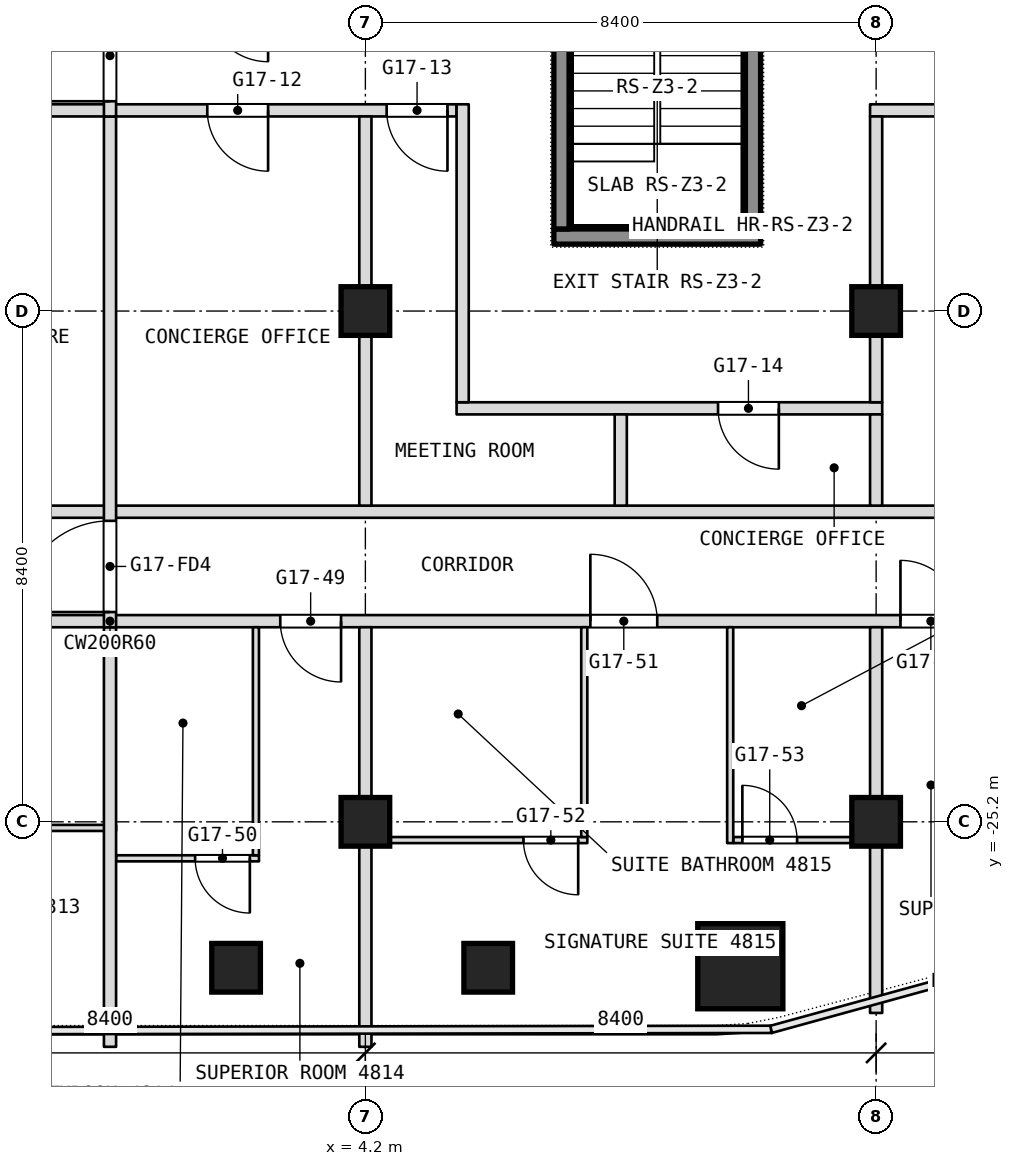
"""IFC4 building model, lengths in metres.
Left out: names, types, materials, properties, quantities, classifications, styles, units other than length and angle.
Written with IfcOpenShell. Run it as: python <this file> out.ifc"""

import sys

from ifc_helpers import new_model, si_unit, direction, frame, frame_2d, origin, origin_2d, place, context, subcontext, project, spatial, rectangle, extrude, element, fill, save


model = new_model("IFC4")
c1 = context("Model", 3, precision=1e-05, world=origin(), true_north=direction((0.0, 1.0)))
c2 = subcontext(c1, "Body", "Model", "MODEL_VIEW")
j1 = project(units=[si_unit("LENGTHUNIT", "METRE"), si_unit("PLANEANGLEUNIT", "RADIAN")], contexts=[c1])
p1 = place(None, origin())
s1 = spatial("IfcSite", under=j1, at=p1, CompositionType="ELEMENT")
p2 = place(p1, origin())
s2 = spatial("IfcBuilding", under=s1, at=p2, CompositionType="ELEMENT")
p3 = place(p2, frame((0.0, 0.0, 209.3)))
s3 = spatial("IfcBuildingStorey", under=s2, at=p3, CompositionType="ELEMENT", Elevation=209.3)
p4 = place(p3, frame((10.366, -27.575, 0.0), z_axis=(0.0, 0.0, 1.0), x_axis=(1.0, 0.0, 0.0)))
e1 = element("IfcColumn", 1, at=p4, inside=s3, PredefinedType="COLUMN", context=c2, shape_type="SweptSolid", body=[
    extrude(rectangle(XDim=1.4, YDim=1.4, at=origin_2d()), origin(), (0.0, 0.0, 1.0), 3.6),
])
for number, where, z_axis, x_axis in (
    (2, (4.2, -25.2, 0.0), (0.0, 0.0, 1.0), (1.0, 0.0, 0.0)),
    (3, (4.2, -16.8, 0.0), (0.0, 0.0, 1.0), (1.0, 0.0, 0.0)),
    (4, (12.6, -25.2, 0.0), (0.0, 0.0, 1.0), (1.0, 0.0, 0.0)),
    (5, (12.6, -16.8, 0.0), (0.0, 0.0, 1.0), (1.0, 0.0, 0.0)),
    (6, (6.22, -27.6, 0.0), (0.0, 0.0, 1.0), (1.0, 0.0, 0.0)),
    (7, (2.073, -27.6, 0.0), (0.0, 0.0, 1.0), (1.0, 0.0, 0.0)),
):
    element("IfcColumn", number, at=place(p3, frame(where, z_axis=z_axis, x_axis=x_axis)), inside=s3, PredefinedType="COLUMN", context=c2, shape_type="SweptSolid", body=[
        extrude(rectangle(XDim=0.8, YDim=0.8, at=origin_2d()), origin(), (0.0, 0.0, 1.0), 3.6),
    ])
p5 = place(p3, frame((0.1, -25.8, 0.0), z_axis=(0.0, 0.0, 1.0), x_axis=(1.0, 0.0, 0.0)))
e8 = element("IfcWall", 8, at=p5, inside=s3, PredefinedType="PARTITIONING", context=c2, shape_type="SweptSolid", body=[
    extrude(rectangle(XDim=2.35, YDim=0.1, at=frame_2d((1.175, 0.0))), origin(), (0.0, 0.0, 1.0), 3.34),
])
p6 = place(p5, frame((1.3, 0.0, 0.0)))
e9 = element("IfcOpeningElement", 9, at=p6, cuts=e8, PredefinedType="OPENING", context=c2, shape_type="SweptSolid", body=[
    extrude(rectangle(XDim=0.9, YDim=2.1, at=frame_2d((0.45, 1.05))), frame((0.0, 0.05, 0.0), z_axis=(0.0, -1.0, 0.0), x_axis=(1.0, 0.0, 0.0)), (0.0, 0.0, 1.0), 0.1),
])
p7 = place(p3, frame((4.3, -25.5, 0.0), z_axis=(0.0, 0.0, 1.0), x_axis=(1.0, 0.0, 0.0)))
e10 = element("IfcWall", 10, at=p7, inside=s3, PredefinedType="PARTITIONING", context=c2, shape_type="SweptSolid", body=[
    extrude(rectangle(XDim=3.55, YDim=0.1, at=frame_2d((1.775, 0.0))), origin(), (0.0, 0.0, 1.0), 3.34),
])
p8 = place(p7, frame((2.5, 0.0, 0.0)))
e11 = element("IfcOpeningElement", 11, at=p8, cuts=e10, PredefinedType="OPENING", context=c2, shape_type="SweptSolid", body=[
    extrude(rectangle(XDim=0.9, YDim=2.1, at=frame_2d((0.45, 1.05))), frame((0.0, 0.05, 0.0), z_axis=(0.0, -1.0, 0.0), x_axis=(1.0, 0.0, 0.0)), (0.0, 0.0, 1.0), 0.1),
])
p9 = place(p3, frame((10.25, -25.5, 0.0), z_axis=(0.0, 0.0, 1.0), x_axis=(1.0, 0.0, 0.0)))
e12 = element("IfcWall", 12, at=p9, inside=s3, PredefinedType="PARTITIONING", context=c2, shape_type="SweptSolid", body=[
    extrude(rectangle(XDim=2.45, YDim=0.1, at=frame_2d((1.225, 0.0))), origin(), (0.0, 0.0, 1.0), 3.34),
])
p10 = place(p9, frame((0.15, 0.0, 0.0)))
e13 = element("IfcOpeningElement", 13, at=p10, cuts=e12, PredefinedType="OPENING", context=c2, shape_type="SweptSolid", body=[
    extrude(rectangle(XDim=0.9, YDim=2.1, at=frame_2d((0.45, 1.05))), frame((0.0, 0.05, 0.0), z_axis=(0.0, -1.0, 0.0), x_axis=(1.0, 0.0, 0.0)), (0.0, 0.0, 1.0), 0.1),
])
p11 = place(p3, frame((-2.35, -25.3, 0.0), z_axis=(0.0, 0.0, 1.0), x_axis=(1.0, 0.0, 0.0)))
e14 = element("IfcWall", 14, at=p11, inside=s3, PredefinedType="PARTITIONING", context=c2, shape_type="SweptSolid", body=[
    extrude(rectangle(XDim=2.45, YDim=0.1, at=frame_2d((1.225, 0.0))), origin(), (0.0, 0.0, 1.0), 2.94),
])
p12 = place(p11, frame((0.15, 0.0, 0.0)))
e15 = element("IfcOpeningElement", 15, at=p12, cuts=e14, PredefinedType="OPENING", context=c2, shape_type="SweptSolid", body=[
    extrude(rectangle(XDim=0.9, YDim=2.1, at=frame_2d((0.45, 1.05))), frame((0.0, 0.05, 0.0), z_axis=(0.0, -1.0, 0.0), x_axis=(1.0, 0.0, 0.0)), (0.0, 0.0, 1.0), 0.1),
])
p13 = place(p3, frame((-16.7, -21.9, 0.0), z_axis=(0.0, 0.0, 1.0), x_axis=(1.0, 0.0, 0.0)))
e16 = element("IfcWall", 16, at=p13, inside=s3, PredefinedType="PARTITIONING", context=c2, shape_type="SweptSolid", body=[
    extrude(rectangle(XDim=33.4, YDim=0.2, at=frame_2d((16.7, 0.0))), origin(), (0.0, 0.0, 1.0), 3.34),
])
p14 = place(p13, frame((0.3, 0.0, 0.0)))
e17 = element("IfcOpeningElement", 17, at=p14, cuts=e16, PredefinedType="OPENING", context=c2, shape_type="SweptSolid", body=[
    extrude(rectangle(XDim=1.0, YDim=2.1, at=frame_2d((0.5, 1.05))), frame((0.0, 0.1, 0.0), z_axis=(0.0, -1.0, 0.0), x_axis=(1.0, 0.0, 0.0)), (0.0, 0.0, 1.0), 0.2),
])
p15 = place(p13, frame((6.9, 0.0, 0.0)))
e18 = element("IfcOpeningElement", 18, at=p15, cuts=e16, PredefinedType="OPENING", context=c2, shape_type="SweptSolid", body=[
    extrude(rectangle(XDim=1.0, YDim=2.1, at=frame_2d((0.5, 1.05))), frame((0.0, 0.1, 0.0), z_axis=(0.0, -1.0, 0.0), x_axis=(1.0, 0.0, 0.0)), (0.0, 0.0, 1.0), 0.2),
])
p16 = place(p13, frame((8.7, 0.0, 0.0)))
e19 = element("IfcOpeningElement", 19, at=p16, cuts=e16, PredefinedType="OPENING", context=c2, shape_type="SweptSolid", body=[
    extrude(rectangle(XDim=1.0, YDim=2.1, at=frame_2d((0.5, 1.05))), frame((0.0, 0.1, 0.0), z_axis=(0.0, -1.0, 0.0), x_axis=(1.0, 0.0, 0.0)), (0.0, 0.0, 1.0), 0.2),
])
p17 = place(p13, frame((12.9, 0.0, 0.0)))
e20 = element("IfcOpeningElement", 20, at=p17, cuts=e16, PredefinedType="OPENING", context=c2, shape_type="SweptSolid", body=[
    extrude(rectangle(XDim=1.0, YDim=2.1, at=frame_2d((0.5, 1.05))), frame((0.0, 0.1, 0.0), z_axis=(0.0, -1.0, 0.0), x_axis=(1.0, 0.0, 0.0)), (0.0, 0.0, 1.0), 0.2),
])
p18 = place(p13, frame((19.5, 0.0, 0.0)))
e21 = element("IfcOpeningElement", 21, at=p18, cuts=e16, PredefinedType="OPENING", context=c2, shape_type="SweptSolid", body=[
    extrude(rectangle(XDim=1.0, YDim=2.1, at=frame_2d((0.5, 1.05))), frame((0.0, 0.1, 0.0), z_axis=(0.0, -1.0, 0.0), x_axis=(1.0, 0.0, 0.0)), (0.0, 0.0, 1.0), 0.2),
])
p19 = place(p13, frame((24.6, 0.0, 0.0)))
e22 = element("IfcOpeningElement", 22, at=p19, cuts=e16, PredefinedType="OPENING", context=c2, shape_type="SweptSolid", body=[
    extrude(rectangle(XDim=1.1, YDim=2.1, at=frame_2d((0.55, 1.05))), frame((0.0, 0.1, 0.0), z_axis=(0.0, -1.0, 0.0), x_axis=(1.0, 0.0, 0.0)), (0.0, 0.0, 1.0), 0.2),
])
p20 = place(p13, frame((29.7, 0.0, 0.0)))
e23 = element("IfcOpeningElement", 23, at=p20, cuts=e16, PredefinedType="OPENING", context=c2, shape_type="SweptSolid", body=[
    extrude(rectangle(XDim=1.0, YDim=2.1, at=frame_2d((0.5, 1.05))), frame((0.0, 0.1, 0.0), z_axis=(0.0, -1.0, 0.0), x_axis=(1.0, 0.0, 0.0)), (0.0, 0.0, 1.0), 0.2),
])
p21 = place(p3, frame((-4.1, -20.1, 0.0), z_axis=(0.0, 0.0, 1.0), x_axis=(1.0, 0.0, 0.0)))
e24 = element("IfcWall", 24, at=p21, inside=s3, PredefinedType="PARTITIONING", context=c2, shape_type="SweptSolid", body=[
    extrude(rectangle(XDim=20.8, YDim=0.2, at=frame_2d((10.4, 0.0))), origin(), (0.0, 0.0, 1.0), 3.34),
])
p22 = place(p3, frame((5.7, -18.4, 0.0), z_axis=(0.0, 0.0, 1.0), x_axis=(1.0, 0.0, 0.0)))
e25 = element("IfcWall", 25, at=p22, inside=s3, PredefinedType="PARTITIONING", context=c2, shape_type="SweptSolid", body=[
    extrude(rectangle(XDim=7.0, YDim=0.2, at=frame_2d((3.5, 0.0))), origin(), (0.0, 0.0, 1.0), 3.34),
])
p23 = place(p22, frame((4.3, 0.0, 0.0)))
e26 = element("IfcOpeningElement", 26, at=p23, cuts=e25, PredefinedType="OPENING", context=c2, shape_type="SweptSolid", body=[
    extrude(rectangle(XDim=1.0, YDim=2.1, at=frame_2d((0.5, 1.05))), frame((0.0, 0.1, 0.0), z_axis=(0.0, -1.0, 0.0), x_axis=(1.0, 0.0, 0.0)), (0.0, 0.0, 1.0), 0.2),
])
p24 = place(p3, frame((-4.3, -13.5, 0.0), z_axis=(0.0, 0.0, 1.0), x_axis=(1.0, 0.0, 0.0)))
e27 = element("IfcWall", 27, at=p24, inside=s3, PredefinedType="PARTITIONING", context=c2, shape_type="SweptSolid", body=[
    extrude(rectangle(XDim=10.0, YDim=0.2, at=frame_2d((5.0, 0.0))), origin(), (0.0, 0.0, 1.0), 3.34),
])
p25 = place(p24, frame((1.7, 0.0, 0.0)))
e28 = element("IfcOpeningElement", 28, at=p25, cuts=e27, PredefinedType="OPENING", context=c2, shape_type="SweptSolid", body=[
    extrude(rectangle(XDim=1.0, YDim=2.1, at=frame_2d((0.5, 1.05))), frame((0.0, 0.1, 0.0), z_axis=(0.0, -1.0, 0.0), x_axis=(1.0, 0.0, 0.0)), (0.0, 0.0, 1.0), 0.2),
])
p26 = place(p24, frame((5.9, 0.0, 0.0)))
e29 = element("IfcOpeningElement", 29, at=p26, cuts=e27, PredefinedType="OPENING", context=c2, shape_type="SweptSolid", body=[
    extrude(rectangle(XDim=1.0, YDim=2.1, at=frame_2d((0.5, 1.05))), frame((0.0, 0.1, 0.0), z_axis=(0.0, -1.0, 0.0), x_axis=(1.0, 0.0, 0.0)), (0.0, 0.0, 1.0), 0.2),
])
p27 = place(p24, frame((8.85, 0.0, 0.0)))
e30 = element("IfcOpeningElement", 30, at=p27, cuts=e27, PredefinedType="OPENING", context=c2, shape_type="SweptSolid", body=[
    extrude(rectangle(XDim=1.0, YDim=2.1, at=frame_2d((0.5, 1.05))), frame((0.0, 0.1, 0.0), z_axis=(0.0, -1.0, 0.0), x_axis=(1.0, 0.0, 0.0)), (0.0, 0.0, 1.0), 0.2),
])
p28 = place(p3, frame((12.5, -13.5, 0.0), z_axis=(0.0, 0.0, 1.0), x_axis=(1.0, 0.0, 0.0)))
e31 = element("IfcWall", 31, at=p28, inside=s3, PredefinedType="PARTITIONING", context=c2, shape_type="SweptSolid", body=[
    extrude(rectangle(XDim=4.2, YDim=0.2, at=frame_2d((2.1, 0.0))), origin(), (0.0, 0.0, 1.0), 3.34),
])
p29 = place(p28, frame((1.7, 0.0, 0.0)))
e32 = element("IfcOpeningElement", 32, at=p29, cuts=e31, PredefinedType="OPENING", context=c2, shape_type="SweptSolid", body=[
    extrude(rectangle(XDim=1.0, YDim=2.1, at=frame_2d((0.5, 1.05))), frame((0.0, 0.1, 0.0), z_axis=(0.0, -1.0, 0.0), x_axis=(1.0, 0.0, 0.0)), (0.0, 0.0, 1.0), 0.2),
])
p30 = place(p3, frame((12.6, -28.343, 0.0), z_axis=(0.0, 0.0, 1.0), x_axis=(0.0, 1.0, 0.0)))
e33 = element("IfcWall", 33, at=p30, inside=s3, PredefinedType="PARTITIONING", context=c2, shape_type="SweptSolid", body=[
    extrude(rectangle(XDim=6.343, YDim=0.2, at=frame_2d((3.171, 0.0))), origin(), (0.0, 0.0, 1.0), 3.34),
])
p31 = place(p3, frame((12.6, -20.0, 0.0), z_axis=(0.0, 0.0, 1.0), x_axis=(0.0, 1.0, 0.0)))
e34 = element("IfcWall", 34, at=p31, inside=s3, PredefinedType="PARTITIONING", context=c2, shape_type="SweptSolid", body=[
    extrude(rectangle(XDim=1.5, YDim=0.2, at=frame_2d((0.75, 0.0))), origin(), (0.0, 0.0, 1.0), 3.34),
])
p32 = place(p3, frame((12.6, -18.3, 0.0), z_axis=(0.0, 0.0, 1.0), x_axis=(0.0, 1.0, 0.0)))
e35 = element("IfcWall", 35, at=p32, inside=s3, PredefinedType="PARTITIONING", context=c2, shape_type="SweptSolid", body=[
    extrude(rectangle(XDim=4.7, YDim=0.2, at=frame_2d((2.35, 0.0))), origin(), (0.0, 0.0, 1.0), 3.34),
])
p33 = place(p3, frame((10.2, -25.55, 0.0), z_axis=(0.0, 0.0, 1.0), x_axis=(0.0, 1.0, 0.0)))
e36 = element("IfcWall", 36, at=p33, inside=s3, PredefinedType="PARTITIONING", context=c2, shape_type="SweptSolid", body=[
    extrude(rectangle(XDim=3.55, YDim=0.1, at=frame_2d((1.775, 0.0))), origin(), (0.0, 0.0, 1.0), 3.34),
])
p34 = place(p3, frame((8.4, -20.0, 0.0), z_axis=(0.0, 0.0, 1.0), x_axis=(0.0, 1.0, 0.0)))
e37 = element("IfcWall", 37, at=p34, inside=s3, PredefinedType="PARTITIONING", context=c2, shape_type="SweptSolid", body=[
    extrude(rectangle(XDim=1.5, YDim=0.2, at=frame_2d((0.75, 0.0))), origin(), (0.0, 0.0, 1.0), 3.34),
])
p35 = place(p3, frame((7.8, -25.45, 0.0), z_axis=(0.0, 0.0, 1.0), x_axis=(0.0, 1.0, 0.0)))
e38 = element("IfcWall", 38, at=p35, inside=s3, PredefinedType="PARTITIONING", context=c2, shape_type="SweptSolid", body=[
    extrude(rectangle(XDim=3.45, YDim=0.1, at=frame_2d((1.725, 0.0))), origin(), (0.0, 0.0, 1.0), 3.34),
])
p36 = place(p3, frame((5.8, -18.3, 0.0), z_axis=(0.0, 0.0, 1.0), x_axis=(0.0, 1.0, 0.0)))
e39 = element("IfcWall", 39, at=p36, inside=s3, PredefinedType="PARTITIONING", context=c2, shape_type="SweptSolid", body=[
    extrude(rectangle(XDim=4.9, YDim=0.2, at=frame_2d((2.45, 0.0))), origin(), (0.0, 0.0, 1.0), 3.34),
])
p37 = place(p3, frame((4.2, -28.9, 0.0), z_axis=(0.0, 0.0, 1.0), x_axis=(0.0, 1.0, 0.0)))
e40 = element("IfcWall", 40, at=p37, inside=s3, PredefinedType="PARTITIONING", context=c2, shape_type="SweptSolid", body=[
    extrude(rectangle(XDim=6.9, YDim=0.2, at=frame_2d((3.45, 0.0))), origin(), (0.0, 0.0, 1.0), 3.34),
])
p38 = place(p3, frame((4.2, -20.0, 0.0), z_axis=(0.0, 0.0, 1.0), x_axis=(0.0, 1.0, 0.0)))
e41 = element("IfcWall", 41, at=p38, inside=s3, PredefinedType="PARTITIONING", context=c2, shape_type="SweptSolid", body=[
    extrude(rectangle(XDim=6.4, YDim=0.2, at=frame_2d((3.2, 0.0))), origin(), (0.0, 0.0, 1.0), 3.34),
])
p39 = place(p3, frame((2.4, -25.75, 0.0), z_axis=(0.0, 0.0, 1.0), x_axis=(0.0, 1.0, 0.0)))
e42 = element("IfcWall", 42, at=p39, inside=s3, PredefinedType="PARTITIONING", context=c2, shape_type="SweptSolid", body=[
    extrude(rectangle(XDim=3.75, YDim=0.1, at=frame_2d((1.875, 0.0))), origin(), (0.0, 0.0, 1.0), 3.34),
])
p40 = place(p3, frame((0.0, -28.9, 0.0), z_axis=(0.0, 0.0, 1.0), x_axis=(0.0, 1.0, 0.0)))
e43 = element("IfcWall", 43, at=p40, inside=s3, PredefinedType="PARTITIONING", context=c2, shape_type="SweptSolid", body=[
    extrude(rectangle(XDim=6.9, YDim=0.2, at=frame_2d((3.45, 0.0))), origin(), (0.0, 0.0, 1.0), 3.34),
])
p41 = place(p3, frame((0.0, -22.0, 0.0), z_axis=(0.0, 0.0, 1.0), x_axis=(0.0, 1.0, 0.0)))
e44 = element("IfcWall", 44, at=p41, inside=s3, PredefinedType="PARTITIONING", context=c2, shape_type="SweptSolid", body=[
    extrude(rectangle(XDim=8.4, YDim=0.2, at=frame_2d((4.2, 0.0))), origin(), (0.0, 0.0, 1.0), 3.34),
])
p42 = place(p41, frame((0.25, 0.0, 0.0)))
e45 = element("IfcOpeningElement", 45, at=p42, cuts=e44, PredefinedType="OPENING", context=c2, shape_type="SweptSolid", body=[
    extrude(rectangle(XDim=1.5, YDim=2.1, at=frame_2d((0.75, 1.05))), frame((0.0, 0.1, 0.0), z_axis=(0.0, -1.0, 0.0), x_axis=(1.0, 0.0, 0.0)), (0.0, 0.0, 1.0), 0.2),
])
p43 = place(p3, frame((0.0, -13.6, 0.0), z_axis=(0.0, 0.0, 1.0), x_axis=(0.0, 1.0, 0.0)))
e46 = element("IfcWall", 46, at=p43, inside=s3, PredefinedType="PARTITIONING", context=c2, shape_type="SweptSolid", body=[
    extrude(rectangle(XDim=13.6, YDim=0.2, at=frame_2d((6.8, 0.0))), origin(), (0.0, 0.0, 1.0), 3.34),
])
p44 = place(p43, frame((11.95, 0.0, 0.0)))
e47 = element("IfcOpeningElement", 47, at=p44, cuts=e46, PredefinedType="OPENING", context=c2, shape_type="SweptSolid", body=[
    extrude(rectangle(XDim=1.5, YDim=2.1, at=frame_2d((0.75, 1.05))), frame((0.0, 0.1, 0.0), z_axis=(0.0, -1.0, 0.0), x_axis=(1.0, 0.0, 0.0)), (0.0, 0.0, 1.0), 0.2),
])
p45 = place(p43, frame((0.25, 0.0, 0.0)))
e48 = element("IfcOpeningElement", 48, at=p45, cuts=e46, PredefinedType="OPENING", context=c2, shape_type="SweptSolid", body=[
    extrude(rectangle(XDim=1.5, YDim=2.1, at=frame_2d((0.75, 1.05))), frame((0.0, 0.1, 0.0), z_axis=(0.0, -1.0, 0.0), x_axis=(1.0, 0.0, 0.0)), (0.0, 0.0, 1.0), 0.2),
])
p46 = place(p3, frame((7.3, -15.575, 0.1), z_axis=(0.0, 0.0, 1.0), x_axis=(1.0, 0.0, 0.0)))
e49 = element("IfcWall", 49, at=p46, inside=s3, PredefinedType="SHEAR", context=c2, shape_type="SweptSolid", body=[
    extrude(rectangle(XDim=3.4, YDim=0.25, at=frame_2d((1.7, 0.0))), origin(), (0.0, 0.0, 1.0), 3.6),
])
for number, where, z_axis, x_axis in (
    (50, (7.425, -15.45, 0.1), (0.0, 0.0, 1.0), (0.0, 1.0, 0.0)),
    (51, (10.575, -15.45, 0.1), (0.0, 0.0, 1.0), (0.0, 1.0, 0.0)),
):
    element("IfcWall", number, at=place(p3, frame(where, z_axis=z_axis, x_axis=x_axis)), inside=s3, PredefinedType="SHEAR", context=c2, shape_type="SweptSolid", body=[
        extrude(rectangle(XDim=5.7, YDim=0.25, at=frame_2d((2.85, 0.0))), origin(), (0.0, 0.0, 1.0), 3.6),
    ])
p47 = place(p6, origin())
e52 = element("IfcDoor", 52, at=p47, inside=s3, OperationType="SINGLE_SWING_RIGHT", PredefinedType="DOOR", context=c2, shape_type="SweptSolid", body=[
    extrude(rectangle(XDim=0.9, YDim=2.1, at=frame_2d((0.45, 1.05))), frame((0.0, 0.025, 0.0), z_axis=(0.0, -1.0, 0.0), x_axis=(1.0, 0.0, 0.0)), (0.0, 0.0, 1.0), 0.05),
])
fill(e9, e52)
p48 = place(p8, origin())
e53 = element("IfcDoor", 53, at=p48, inside=s3, OperationType="SINGLE_SWING_RIGHT", PredefinedType="DOOR", context=c2, shape_type="SweptSolid", body=[
    extrude(rectangle(XDim=0.9, YDim=2.1, at=frame_2d((0.45, 1.05))), frame((0.0, 0.025, 0.0), z_axis=(0.0, -1.0, 0.0), x_axis=(1.0, 0.0, 0.0)), (0.0, 0.0, 1.0), 0.05),
])
fill(e11, e53)
p49 = place(p10, origin())
e54 = element("IfcDoor", 54, at=p49, inside=s3, OperationType="SINGLE_SWING_LEFT", PredefinedType="DOOR", context=c2, shape_type="SweptSolid", body=[
    extrude(rectangle(XDim=0.9, YDim=2.1, at=frame_2d((0.45, 1.05))), frame((0.0, 0.025, 0.0), z_axis=(0.0, -1.0, 0.0), x_axis=(1.0, 0.0, 0.0)), (0.0, 0.0, 1.0), 0.05),
])
fill(e13, e54)
p50 = place(p18, origin())
e55 = element("IfcDoor", 55, at=p50, inside=s3, OperationType="SINGLE_SWING_LEFT", PredefinedType="DOOR", context=c2, shape_type="SweptSolid", body=[
    extrude(rectangle(XDim=1.0, YDim=2.1, at=frame_2d((0.5, 1.05))), frame((0.0, 0.025, 0.0), z_axis=(0.0, -1.0, 0.0), x_axis=(1.0, 0.0, 0.0)), (0.0, 0.0, 1.0), 0.05),
])
fill(e21, e55)
p51 = place(p19, origin())
e56 = element("IfcDoor", 56, at=p51, inside=s3, OperationType="SINGLE_SWING_RIGHT", PredefinedType="DOOR", context=c2, shape_type="SweptSolid", body=[
    extrude(rectangle(XDim=1.1, YDim=2.1, at=frame_2d((0.55, 1.05))), frame((0.0, 0.025, 0.0), z_axis=(0.0, -1.0, 0.0), x_axis=(1.0, 0.0, 0.0)), (0.0, 0.0, 1.0), 0.05),
])
fill(e22, e56)
p52 = place(p20, origin())
e57 = element("IfcDoor", 57, at=p52, inside=s3, OperationType="SINGLE_SWING_RIGHT", PredefinedType="DOOR", context=c2, shape_type="SweptSolid", body=[
    extrude(rectangle(XDim=1.0, YDim=2.1, at=frame_2d((0.5, 1.05))), frame((0.0, 0.025, 0.0), z_axis=(0.0, -1.0, 0.0), x_axis=(1.0, 0.0, 0.0)), (0.0, 0.0, 1.0), 0.05),
])
fill(e23, e57)
p53 = place(p23, origin())
e58 = element("IfcDoor", 58, at=p53, inside=s3, OperationType="SINGLE_SWING_LEFT", PredefinedType="DOOR", context=c2, shape_type="SweptSolid", body=[
    extrude(rectangle(XDim=1.0, YDim=2.1, at=frame_2d((0.5, 1.05))), frame((0.0, 0.025, 0.0), z_axis=(0.0, -1.0, 0.0), x_axis=(1.0, 0.0, 0.0)), (0.0, 0.0, 1.0), 0.05),
])
fill(e26, e58)
p54 = place(p26, origin())
e59 = element("IfcDoor", 59, at=p54, inside=s3, OperationType="SINGLE_SWING_RIGHT", PredefinedType="DOOR", context=c2, shape_type="SweptSolid", body=[
    extrude(rectangle(XDim=1.0, YDim=2.1, at=frame_2d((0.5, 1.05))), frame((0.0, 0.025, 0.0), z_axis=(0.0, -1.0, 0.0), x_axis=(1.0, 0.0, 0.0)), (0.0, 0.0, 1.0), 0.05),
])
fill(e29, e59)
p55 = place(p27, origin())
e60 = element("IfcDoor", 60, at=p55, inside=s3, OperationType="SINGLE_SWING_LEFT", PredefinedType="DOOR", context=c2, shape_type="SweptSolid", body=[
    extrude(rectangle(XDim=1.0, YDim=2.1, at=frame_2d((0.5, 1.05))), frame((0.0, 0.025, 0.0), z_axis=(0.0, -1.0, 0.0), x_axis=(1.0, 0.0, 0.0)), (0.0, 0.0, 1.0), 0.05),
])
fill(e30, e60)
p56 = place(p45, origin())
e61 = element("IfcDoor", 61, at=p56, inside=s3, OperationType="DOUBLE_DOOR_DOUBLE_SWING", PredefinedType="DOOR", context=c2, shape_type="SweptSolid", body=[
    extrude(rectangle(XDim=1.5, YDim=2.1, at=frame_2d((0.75, 1.05))), frame((0.0, 0.025, 0.0), z_axis=(0.0, -1.0, 0.0), x_axis=(1.0, 0.0, 0.0)), (0.0, 0.0, 1.0), 0.05),
])
fill(e48, e61)
p57 = place(p42, origin())
e62 = element("IfcDoor", 62, at=p57, inside=s3, OperationType="DOUBLE_DOOR_DOUBLE_SWING", PredefinedType="DOOR", context=c2, shape_type="SweptSolid", body=[
    extrude(rectangle(XDim=1.5, YDim=2.1, at=frame_2d((0.75, 1.05))), frame((0.0, 0.025, 0.0), z_axis=(0.0, -1.0, 0.0), x_axis=(1.0, 0.0, 0.0)), (0.0, 0.0, 1.0), 0.05),
])
fill(e45, e62)
save(model, sys.argv[1])
